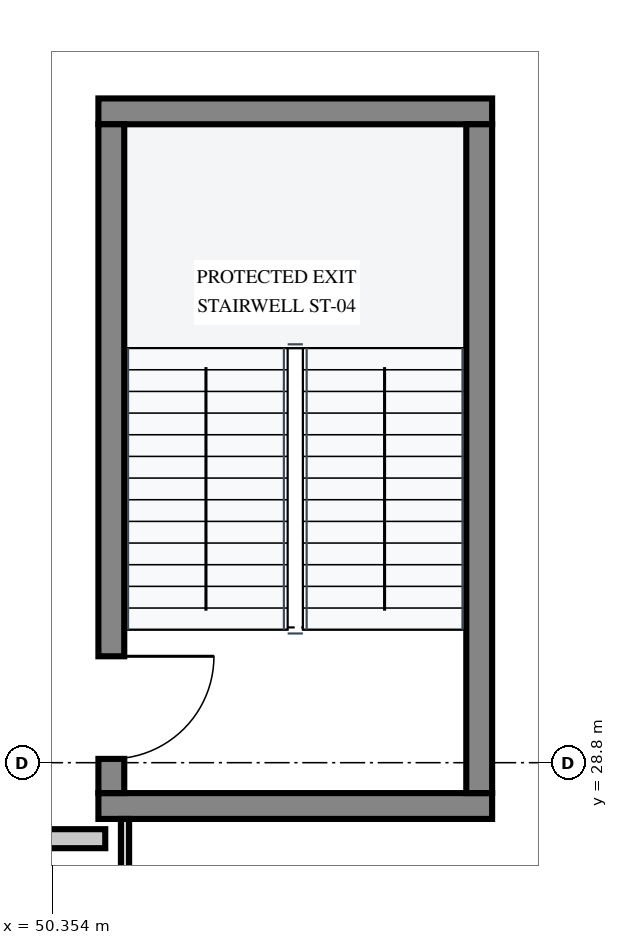
"""IFC4 building model, lengths in metres.
Left out: names, types, materials, properties, quantities, classifications, styles, units other than length and angle.
Written with IfcOpenShell. Run it as: python <this file> out.ifc"""

import sys

from ifc_helpers import new_model, si_unit, direction, frame, frame_2d, origin, place, context, subcontext, project, spatial, rectangle, extrude, element, fill, save


model = new_model("IFC4")
c1 = context("Model", 3, precision=1e-05, world=origin(), true_north=direction((0.0, 1.0)))
c2 = subcontext(c1, "Body", "Model", "MODEL_VIEW")
j1 = project(units=[si_unit("LENGTHUNIT", "METRE"), si_unit("PLANEANGLEUNIT", "RADIAN")], contexts=[c1])
p1 = place(None, origin())
s1 = spatial("IfcSite", under=j1, at=p1, CompositionType="ELEMENT")
p2 = place(p1, origin())
s2 = spatial("IfcBuilding", under=s1, at=p2, CompositionType="ELEMENT")
p3 = place(p2, frame((0.0, 0.0, 24.6)))
s3 = spatial("IfcBuildingStorey", under=s2, at=p3, CompositionType="ELEMENT", Elevation=24.6)
for number, where, z_axis, x_axis in (
    (1, (50.96, 28.23, 0.0), (0.0, 0.0, 1.0), (1.0, 0.0, 0.0)),
    (2, (50.96, 37.37, 0.0), (0.0, 0.0, 1.0), (1.0, 0.0, 0.0)),
):
    element("IfcWall", number, at=place(p3, frame(where, z_axis=z_axis, x_axis=x_axis)), inside=s3, PredefinedType="SHEAR", context=c2, shape_type="SweptSolid", body=[
        extrude(rectangle(XDim=5.18, YDim=0.34, at=frame_2d((2.59, 0.0))), origin(), (0.0, 0.0, 1.0), 4.51),
    ])
p4 = place(p3, frame((55.97, 28.4, 0.0), z_axis=(0.0, 0.0, 1.0), x_axis=(0.0, 1.0, 0.0)))
e3 = element("IfcWall", 3, at=p4, inside=s3, PredefinedType="SHEAR", context=c2, shape_type="SweptSolid", body=[
    extrude(rectangle(XDim=8.8, YDim=0.34, at=frame_2d((4.4, 0.0))), origin(), (0.0, 0.0, 1.0), 4.51),
])
p5 = place(p3, frame((51.13, 28.4, 0.0), z_axis=(0.0, 0.0, 1.0), x_axis=(0.0, 1.0, 0.0)))
e4 = element("IfcWall", 4, at=p5, inside=s3, PredefinedType="SHEAR", context=c2, shape_type="SweptSolid", body=[
    extrude(rectangle(XDim=8.8, YDim=0.34, at=frame_2d((4.4, 0.0))), origin(), (0.0, 0.0, 1.0), 4.51),
])
p6 = place(p5, frame((0.45, 0.0, 0.0)))
e5 = element("IfcOpeningElement", 5, at=p6, cuts=e4, PredefinedType="OPENING", context=c2, shape_type="SweptSolid", body=[
    extrude(rectangle(XDim=1.35, YDim=2.2, at=frame_2d((0.675, 1.1))), frame((0.0, 0.182, 0.0), z_axis=(0.0, -1.0, 0.0), x_axis=(1.0, 0.0, 0.0)), (0.0, 0.0, 1.0), 0.364),
])
p7 = place(p3, frame((48.2, 27.8, 0.0), z_axis=(0.0, 0.0, 1.0), x_axis=(1.0, 0.0, 0.0)))
e6 = element("IfcWall", 6, at=p7, inside=s3, PredefinedType="PARTITIONING", context=c2, shape_type="SweptSolid", body=[
    extrude(rectangle(XDim=2.85, YDim=0.25, at=frame_2d((1.425, 0.0))), origin(), (0.0, 0.0, 1.0), 3.45),
])
p8 = place(p3, frame((51.31, 23.745, 0.0), z_axis=(0.0, 0.0, 1.0), x_axis=(0.0, 1.0, 0.0)))
e7 = element("IfcWall", 7, at=p8, inside=s3, PredefinedType="PARTITIONING", context=c2, shape_type="SweptSolid", body=[
    extrude(rectangle(XDim=4.315, YDim=0.108, at=frame_2d((2.158, 0.0))), origin(), (0.0, 0.0, 1.0), 4.51),
])
p9 = place(p6, frame((1.35, 0.0, 0.0), z_axis=(0.0, 0.0, 1.0), x_axis=(-1.0, 0.0, 0.0)))
e8 = element("IfcDoor", 8, at=p9, inside=s3, OperationType="SINGLE_SWING_LEFT", PredefinedType="DOOR", context=c2, shape_type="SweptSolid", body=[
    extrude(rectangle(XDim=1.35, YDim=2.2, at=frame_2d((0.675, 1.1))), frame((0.0, 0.025, 0.0), z_axis=(0.0, -1.0, 0.0), x_axis=(1.0, 0.0, 0.0)), (0.0, 0.0, 1.0), 0.05),
])
fill(e5, e8)
save(model, sys.argv[1])
